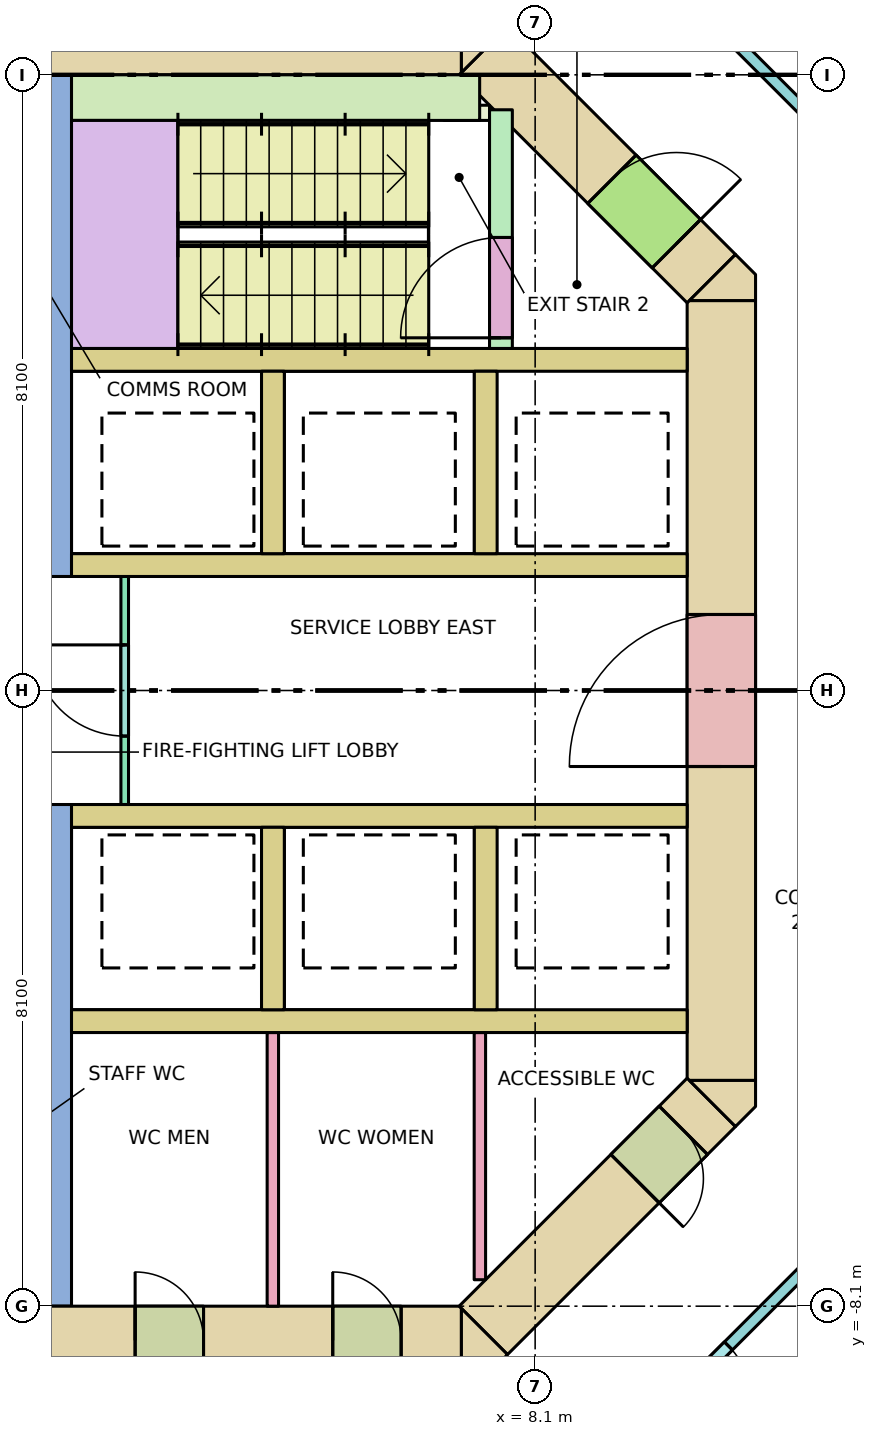
"""IFC4 building model, lengths in metres.
Left out: names, types, materials, properties, quantities, classifications, styles, units other than length and angle.
Written with IfcOpenShell. Run it as: python <this file> out.ifc"""

import sys

from ifc_helpers import new_model, si_unit, direction, frame, frame_2d, origin, place, context, subcontext, project, spatial, polyline, rectangle, outline, extrude, element, fill, save


model = new_model("IFC4")
c1 = context("Model", 3, precision=1e-05, world=origin(), true_north=direction((0.0, 1.0)))
c2 = subcontext(c1, "Body", "Model", "MODEL_VIEW")
j1 = project(units=[si_unit("LENGTHUNIT", "METRE"), si_unit("PLANEANGLEUNIT", "RADIAN")], contexts=[c1])
p1 = place(None, origin())
s1 = spatial("IfcSite", under=j1, at=p1, CompositionType="ELEMENT")
p2 = place(p1, origin())
s2 = spatial("IfcBuilding", under=s1, at=p2, CompositionType="ELEMENT")
p3 = place(p2, frame((0.0, 0.0, 71.0)))
s3 = spatial("IfcBuildingStorey", under=s2, at=p3, CompositionType="ELEMENT", Elevation=71.0)
p4 = place(p3, frame((-7.13, 8.55, -0.28), z_axis=(0.0, 0.0, 1.0), x_axis=(1.0, 0.0, 0.0)))
e1 = element("IfcWall", 1, at=p4, inside=s3, PredefinedType="SHEAR", context=c2, shape_type="SweptSolid", body=[
    extrude(rectangle(XDim=14.26, YDim=0.9, at=frame_2d((7.13, 0.0))), origin(), (0.0, 0.0, 1.0), 4.0),
])
p5 = place(p4, frame((5.48, 0.0, 0.28)))
e2 = element("IfcOpeningElement", 2, at=p5, cuts=e1, PredefinedType="OPENING", context=c2, shape_type="SweptSolid", body=[
    extrude(rectangle(XDim=0.7, YDim=2.1, at=frame_2d((0.35, 1.05))), frame((0.0, 0.46, 0.0), z_axis=(0.0, -1.0, 0.0), x_axis=(1.0, 0.0, 0.0)), (0.0, 0.0, 1.0), 0.92),
])
p6 = place(p4, frame((6.53, 0.0, 0.28)))
e3 = element("IfcOpeningElement", 3, at=p6, cuts=e1, PredefinedType="OPENING", context=c2, shape_type="SweptSolid", body=[
    extrude(rectangle(XDim=0.85, YDim=2.1, at=frame_2d((0.425, 1.05))), frame((0.0, 0.46, 0.0), z_axis=(0.0, -1.0, 0.0), x_axis=(1.0, 0.0, 0.0)), (0.0, 0.0, 1.0), 0.92),
])
p7 = place(p4, frame((7.83, 0.0, 0.28)))
e4 = element("IfcOpeningElement", 4, at=p7, cuts=e1, PredefinedType="OPENING", context=c2, shape_type="SweptSolid", body=[
    extrude(rectangle(XDim=0.85, YDim=2.1, at=frame_2d((0.425, 1.05))), frame((0.0, 0.46, 0.0), z_axis=(0.0, -1.0, 0.0), x_axis=(1.0, 0.0, 0.0)), (0.0, 0.0, 1.0), 0.92),
])
p8 = place(p3, frame((-7.13, -8.55, -0.28), z_axis=(0.0, 0.0, 1.0), x_axis=(1.0, 0.0, 0.0)))
e5 = element("IfcWall", 5, at=p8, inside=s3, PredefinedType="SHEAR", context=c2, shape_type="SweptSolid", body=[
    extrude(rectangle(XDim=14.26, YDim=0.9, at=frame_2d((7.13, 0.0))), origin(), (0.0, 0.0, 1.0), 4.0),
])
p9 = place(p8, frame((8.08, 0.0, 0.28)))
e6 = element("IfcOpeningElement", 6, at=p9, cuts=e5, PredefinedType="OPENING", context=c2, shape_type="SweptSolid", body=[
    extrude(rectangle(XDim=0.7, YDim=2.1, at=frame_2d((0.35, 1.05))), frame((0.0, 0.46, 0.0), z_axis=(0.0, -1.0, 0.0), x_axis=(1.0, 0.0, 0.0)), (0.0, 0.0, 1.0), 0.92),
])
p10 = place(p8, frame((5.58, 0.0, 0.28)))
e7 = element("IfcOpeningElement", 7, at=p10, cuts=e5, PredefinedType="OPENING", context=c2, shape_type="SweptSolid", body=[
    extrude(rectangle(XDim=0.85, YDim=2.1, at=frame_2d((0.425, 1.05))), frame((0.0, 0.46, 0.0), z_axis=(0.0, -1.0, 0.0), x_axis=(1.0, 0.0, 0.0)), (0.0, 0.0, 1.0), 0.92),
])
p11 = place(p8, frame((6.88, 0.0, 0.28)))
e8 = element("IfcOpeningElement", 8, at=p11, cuts=e5, PredefinedType="OPENING", context=c2, shape_type="SweptSolid", body=[
    extrude(rectangle(XDim=0.85, YDim=2.1, at=frame_2d((0.425, 1.05))), frame((0.0, 0.46, 0.0), z_axis=(0.0, -1.0, 0.0), x_axis=(1.0, 0.0, 0.0)), (0.0, 0.0, 1.0), 0.92),
])
p12 = place(p8, frame((9.967, 0.0, 0.28)))
e9 = element("IfcOpeningElement", 9, at=p12, cuts=e5, PredefinedType="OPENING", context=c2, shape_type="SweptSolid", body=[
    extrude(rectangle(XDim=0.9, YDim=2.1, at=frame_2d((0.45, 1.05))), frame((0.0, 0.46, 0.0), z_axis=(0.0, -1.0, 0.0), x_axis=(1.0, 0.0, 0.0)), (0.0, 0.0, 1.0), 0.92),
])
p13 = place(p8, frame((12.567, 0.0, 0.28)))
e10 = element("IfcOpeningElement", 10, at=p13, cuts=e5, PredefinedType="OPENING", context=c2, shape_type="SweptSolid", body=[
    extrude(rectangle(XDim=0.9, YDim=2.1, at=frame_2d((0.45, 1.05))), frame((0.0, 0.46, 0.0), z_axis=(0.0, -1.0, 0.0), x_axis=(1.0, 0.0, 0.0)), (0.0, 0.0, 1.0), 0.92),
])
p14 = place(p3, frame((10.55, -5.13, -0.28), z_axis=(0.0, 0.0, 1.0), x_axis=(0.0, 1.0, 0.0)))
e11 = element("IfcWall", 11, at=p14, inside=s3, PredefinedType="SHEAR", context=c2, shape_type="SweptSolid", body=[
    extrude(rectangle(XDim=10.26, YDim=0.9, at=frame_2d((5.13, 0.0))), origin(), (0.0, 0.0, 1.0), 4.0),
])
p15 = place(p14, frame((4.13, 0.0, 0.28)))
e12 = element("IfcOpeningElement", 12, at=p15, cuts=e11, PredefinedType="OPENING", context=c2, shape_type="SweptSolid", body=[
    extrude(rectangle(XDim=2.0, YDim=2.1, at=frame_2d((1.0, 1.05))), frame((0.0, 0.46, 0.0), z_axis=(0.0, -1.0, 0.0), x_axis=(1.0, 0.0, 0.0)), (0.0, 0.0, 1.0), 0.92),
])
p16 = place(p3, frame((7.418, 8.418, -0.28), z_axis=(0.0, 0.0, 1.0), x_axis=(0.707106781187, -0.707106781187, 0.0)))
e13 = element("IfcWall", 13, at=p16, inside=s3, PredefinedType="SHEAR", context=c2, shape_type="SweptSolid", body=[
    extrude(rectangle(XDim=4.243, YDim=0.9, at=frame_2d((2.121, 0.0))), origin(), (0.0, 0.0, 1.0), 4.0),
])
p17 = place(p16, frame((2.393, 0.0, 0.28)))
e14 = element("IfcOpeningElement", 14, at=p17, cuts=e13, PredefinedType="OPENING", context=c2, shape_type="SweptSolid", body=[
    extrude(rectangle(XDim=1.2, YDim=2.1, at=frame_2d((0.6, 1.05))), frame((0.0, 0.46, 0.0), z_axis=(0.0, -1.0, 0.0), x_axis=(1.0, 0.0, 0.0)), (0.0, 0.0, 1.0), 0.92),
])
p18 = place(p3, frame((10.418, -5.418, -0.28), z_axis=(0.0, 0.0, 1.0), x_axis=(-0.707106781187, -0.707106781187, 0.0)))
e15 = element("IfcWall", 15, at=p18, inside=s3, PredefinedType="SHEAR", context=c2, shape_type="SweptSolid", body=[
    extrude(rectangle(XDim=4.243, YDim=0.9, at=frame_2d((2.121, 0.0))), origin(), (0.0, 0.0, 1.0), 4.0),
])
p19 = place(p18, frame((0.52, 0.0, 0.28)))
e16 = element("IfcOpeningElement", 16, at=p19, cuts=e15, PredefinedType="OPENING", context=c2, shape_type="SweptSolid", body=[
    extrude(rectangle(XDim=0.9, YDim=2.1, at=frame_2d((0.45, 1.05))), frame((0.0, 0.46, 0.0), z_axis=(0.0, -1.0, 0.0), x_axis=(1.0, 0.0, 0.0)), (0.0, 0.0, 1.0), 0.92),
])
p20 = place(p3, frame((0.0, 0.0, -0.28)))
e17 = element("IfcWall", 17, at=p20, inside=s3, PredefinedType="SHEAR", context=c2, shape_type="SweptSolid", body=[
    extrude(outline(polyline([(7.473, -9.0), (7.13, -9.0), (7.13, -8.13), (7.736, -8.736), (7.473, -9.0)])), origin(), (0.0, 0.0, 1.0), 4.0),
])
p21 = place(p3, frame((0.0, 0.0, -0.28)))
e18 = element("IfcWall", 18, at=p21, inside=s3, PredefinedType="SHEAR", context=c2, shape_type="SweptSolid", body=[
    extrude(outline(polyline([(11.0, -5.473), (10.736, -5.736), (10.13, -5.13), (11.0, -5.13), (11.0, -5.473)])), origin(), (0.0, 0.0, 1.0), 4.0),
])
p22 = place(p3, frame((0.0, 0.0, -0.28)))
e19 = element("IfcWall", 19, at=p22, inside=s3, PredefinedType="SHEAR", context=c2, shape_type="SweptSolid", body=[
    extrude(outline(polyline([(11.0, 5.473), (11.0, 5.13), (10.13, 5.13), (10.736, 5.736), (11.0, 5.473)])), origin(), (0.0, 0.0, 1.0), 4.0),
])
p23 = place(p3, frame((0.0, 0.0, -0.28)))
e20 = element("IfcWall", 20, at=p23, inside=s3, PredefinedType="SHEAR", context=c2, shape_type="SweptSolid", body=[
    extrude(outline(polyline([(7.473, 9.0), (7.736, 8.736), (7.13, 8.13), (7.13, 9.0), (7.473, 9.0)])), origin(), (0.0, 0.0, 1.0), 4.0),
])
for number, where, z_axis, x_axis in (
    (21, (2.0, 4.35, 0.0), (0.0, 0.0, 1.0), (1.0, 0.0, 0.0)),
    (22, (2.0, -4.35, 0.0), (0.0, 0.0, 1.0), (1.0, 0.0, 0.0)),
    (23, (2.0, 1.65, 0.0), (0.0, 0.0, 1.0), (1.0, 0.0, 0.0)),
    (24, (2.0, -1.65, 0.0), (0.0, 0.0, 1.0), (1.0, 0.0, 0.0)),
):
    element("IfcWall", number, at=place(p3, frame(where, z_axis=z_axis, x_axis=x_axis)), inside=s3, PredefinedType="SOLIDWALL", context=c2, shape_type="SweptSolid", body=[
        extrude(rectangle(XDim=8.1, YDim=0.3, at=frame_2d((4.05, 0.0))), origin(), (0.0, 0.0, 1.0), 3.72),
    ])
for number, where, z_axis, x_axis in (
    (25, (4.65, 1.8, 0.0), (0.0, 0.0, 1.0), (0.0, 1.0, 0.0)),
    (26, (4.65, -4.2, 0.0), (0.0, 0.0, 1.0), (0.0, 1.0, 0.0)),
    (27, (7.45, 1.8, 0.0), (0.0, 0.0, 1.0), (0.0, 1.0, 0.0)),
    (28, (7.45, -4.2, 0.0), (0.0, 0.0, 1.0), (0.0, 1.0, 0.0)),
):
    element("IfcWall", number, at=place(p3, frame(where, z_axis=z_axis, x_axis=x_axis)), inside=s3, PredefinedType="SOLIDWALL", context=c2, shape_type="SweptSolid", body=[
        extrude(rectangle(XDim=2.4, YDim=0.3, at=frame_2d((1.2, 0.0))), origin(), (0.0, 0.0, 1.0), 3.72),
    ])
for number, where, z_axis, x_axis in (
    (29, (1.85, 1.5, 0.0), (0.0, 0.0, 1.0), (0.0, 1.0, 0.0)),
    (30, (1.85, -8.1, 0.0), (0.0, 0.0, 1.0), (0.0, 1.0, 0.0)),
):
    element("IfcWall", number, at=place(p3, frame(where, z_axis=z_axis, x_axis=x_axis)), inside=s3, PredefinedType="SHEAR", context=c2, shape_type="SweptSolid", body=[
        extrude(rectangle(XDim=6.6, YDim=0.3, at=frame_2d((3.3, 0.0))), origin(), (0.0, 0.0, 1.0), 3.72),
    ])
p24 = place(p3, frame((7.65, 4.5, 0.0), z_axis=(0.0, 0.0, 1.0), x_axis=(0.0, 1.0, 0.0)))
e31 = element("IfcWall", 31, at=p24, inside=s3, PredefinedType="SHEAR", context=c2, shape_type="SweptSolid", body=[
    extrude(rectangle(XDim=3.14, YDim=0.3, at=frame_2d((1.57, 0.0))), origin(), (0.0, 0.0, 1.0), 3.72),
])
p25 = place(p24, frame((0.14, 0.0, 0.0)))
e32 = element("IfcOpeningElement", 32, at=p25, cuts=e31, PredefinedType="OPENING", context=c2, shape_type="SweptSolid", body=[
    extrude(rectangle(XDim=1.32, YDim=2.1, at=frame_2d((0.66, 1.05))), frame((0.0, 0.16, 0.0), z_axis=(0.0, -1.0, 0.0), x_axis=(1.0, 0.0, 0.0)), (0.0, 0.0, 1.0), 0.32),
])
p26 = place(p3, frame((2.0, 7.8, 0.0), z_axis=(0.0, 0.0, 1.0), x_axis=(1.0, 0.0, 0.0)))
e33 = element("IfcWall", 33, at=p26, inside=s3, PredefinedType="SHEAR", context=c2, shape_type="SweptSolid", body=[
    extrude(rectangle(XDim=5.37, YDim=0.6, at=frame_2d((2.685, 0.0))), origin(), (0.0, 0.0, 1.0), 3.72),
])
p27 = place(p3, frame((6.9, 7.6, 0.0), z_axis=(0.0, 0.0, 1.0), x_axis=(1.0, 0.0, 0.0)))
e34 = element("IfcWall", 34, at=p27, inside=s3, PredefinedType="SHEAR", context=c2, shape_type="SweptSolid", body=[
    extrude(rectangle(XDim=0.6, YDim=0.2, at=frame_2d((0.3, 0.0))), origin(), (0.0, 0.0, 1.0), 3.72),
])
p28 = place(p3, frame((2.7, -1.5, 0.0), z_axis=(0.0, 0.0, 1.0), x_axis=(0.0, 1.0, 0.0)))
e35 = element("IfcWall", 35, at=p28, inside=s3, PredefinedType="PARTITIONING", context=c2, shape_type="SweptSolid", body=[
    extrude(rectangle(XDim=3.0, YDim=0.1, at=frame_2d((1.5, 0.0))), origin(), (0.0, 0.0, 1.0), 3.72),
])
p29 = place(p28, frame((0.9, 0.0, 0.0)))
e36 = element("IfcOpeningElement", 36, at=p29, cuts=e35, PredefinedType="OPENING", context=c2, shape_type="SweptSolid", body=[
    extrude(rectangle(XDim=1.2, YDim=2.1, at=frame_2d((0.6, 1.05))), frame((0.0, 0.06, 0.0), z_axis=(0.0, -1.0, 0.0), x_axis=(1.0, 0.0, 0.0)), (0.0, 0.0, 1.0), 0.12),
])
p30 = place(p3, frame((4.649, -8.1, 0.0), z_axis=(0.0, 0.0, 1.0), x_axis=(0.0, 1.0, 0.0)))
e37 = element("IfcWall", 37, at=p30, inside=s3, PredefinedType="PARTITIONING", context=c2, shape_type="SweptSolid", body=[
    extrude(rectangle(XDim=3.6, YDim=0.15, at=frame_2d((1.8, 0.0))), origin(), (0.0, 0.0, 1.0), 3.72),
])
p31 = place(p3, frame((7.373, -7.752, 0.0), z_axis=(0.0, 0.0, 1.0), x_axis=(0.0, 1.0, 0.0)))
e38 = element("IfcWall", 38, at=p31, inside=s3, PredefinedType="PARTITIONING", context=c2, shape_type="SweptSolid", body=[
    extrude(rectangle(XDim=3.252, YDim=0.15, at=frame_2d((1.626, 0.0))), origin(), (0.0, 0.0, 1.0), 3.72),
])
p32 = place(p3, frame((8.328, 10.938, 0.0), z_axis=(0.0, 0.0, 1.0), x_axis=(0.707125355289, -0.707088206597, 0.0)))
e39 = element("IfcWall", 39, at=p32, inside=s3, PredefinedType="PARTITIONING", context=c2, shape_type="SweptSolid", body=[
    extrude(rectangle(XDim=6.572, YDim=0.15, at=frame_2d((3.286, 0.0))), origin(), (0.0, 0.0, 1.0), 2.82),
])
p33 = place(p3, frame((12.975, -6.291, 0.0), z_axis=(0.0, 0.0, 1.0), x_axis=(-0.707125355289, -0.707088206597, 0.0)))
e40 = element("IfcWall", 40, at=p33, inside=s3, PredefinedType="PARTITIONING", context=c2, shape_type="SweptSolid", body=[
    extrude(rectangle(XDim=6.572, YDim=0.15, at=frame_2d((3.286, 0.0))), origin(), (0.0, 0.0, 1.0), 2.82),
])
p34 = place(p33, frame((3.298, 0.0, 0.0)))
e41 = element("IfcOpeningElement", 41, at=p34, cuts=e40, PredefinedType="OPENING", context=c2, shape_type="SweptSolid", body=[
    extrude(rectangle(XDim=1.0, YDim=2.1, at=frame_2d((0.5, 1.05))), frame((0.0, 0.085, 0.0), z_axis=(0.0, -1.0, 0.0), x_axis=(1.0, 0.0, 0.0)), (0.0, 0.0, 1.0), 0.17),
])
p35 = place(p25, origin())
e42 = element("IfcDoor", 42, at=p35, inside=s3, OperationType="DOUBLE_DOOR_SINGLE_SWING", PredefinedType="DOOR", context=c2, shape_type="SweptSolid", body=[
    extrude(rectangle(XDim=1.32, YDim=2.1, at=frame_2d((0.66, 1.05))), frame((0.0, 0.025, 0.0), z_axis=(0.0, -1.0, 0.0), x_axis=(1.0, 0.0, 0.0)), (0.0, 0.0, 1.0), 0.05),
])
fill(e32, e42)
p36 = place(p17, origin())
e43 = element("IfcDoor", 43, at=p36, inside=s3, OperationType="SINGLE_SWING_RIGHT", PredefinedType="DOOR", context=c2, shape_type="SweptSolid", body=[
    extrude(rectangle(XDim=1.2, YDim=2.1, at=frame_2d((0.6, 1.05))), frame((0.0, 0.025, 0.0), z_axis=(0.0, -1.0, 0.0), x_axis=(1.0, 0.0, 0.0)), (0.0, 0.0, 1.0), 0.05),
])
fill(e14, e43)
p37 = place(p15, origin())
e44 = element("IfcDoor", 44, at=p37, inside=s3, OperationType="DOUBLE_DOOR_SINGLE_SWING", PredefinedType="DOOR", context=c2, shape_type="SweptSolid", body=[
    extrude(rectangle(XDim=2.0, YDim=2.1, at=frame_2d((1.0, 1.05))), frame((0.0, 0.025, 0.0), z_axis=(0.0, -1.0, 0.0), x_axis=(1.0, 0.0, 0.0)), (0.0, 0.0, 1.0), 0.05),
])
fill(e12, e44)
p38 = place(p29, origin())
e45 = element("IfcDoor", 45, at=p38, inside=s3, OperationType="SINGLE_SWING_RIGHT", PredefinedType="DOOR", context=c2, shape_type="SweptSolid", body=[
    extrude(rectangle(XDim=1.2, YDim=2.1, at=frame_2d((0.6, 1.05))), frame((0.0, 0.025, 0.0), z_axis=(0.0, -1.0, 0.0), x_axis=(1.0, 0.0, 0.0)), (0.0, 0.0, 1.0), 0.05),
])
fill(e36, e45)
p39 = place(p12, origin())
e46 = element("IfcDoor", 46, at=p39, inside=s3, OperationType="SINGLE_SWING_LEFT", PredefinedType="DOOR", context=c2, shape_type="SweptSolid", body=[
    extrude(rectangle(XDim=0.9, YDim=2.1, at=frame_2d((0.45, 1.05))), frame((0.0, 0.025, 0.0), z_axis=(0.0, -1.0, 0.0), x_axis=(1.0, 0.0, 0.0)), (0.0, 0.0, 1.0), 0.05),
])
fill(e9, e46)
p40 = place(p13, origin())
e47 = element("IfcDoor", 47, at=p40, inside=s3, OperationType="SINGLE_SWING_LEFT", PredefinedType="DOOR", context=c2, shape_type="SweptSolid", body=[
    extrude(rectangle(XDim=0.9, YDim=2.1, at=frame_2d((0.45, 1.05))), frame((0.0, 0.025, 0.0), z_axis=(0.0, -1.0, 0.0), x_axis=(1.0, 0.0, 0.0)), (0.0, 0.0, 1.0), 0.05),
])
fill(e10, e47)
p41 = place(p19, origin())
e48 = element("IfcDoor", 48, at=p41, inside=s3, OperationType="SINGLE_SWING_RIGHT", PredefinedType="DOOR", context=c2, shape_type="SweptSolid", body=[
    extrude(rectangle(XDim=0.9, YDim=2.1, at=frame_2d((0.45, 1.05))), frame((0.0, 0.025, 0.0), z_axis=(0.0, -1.0, 0.0), x_axis=(1.0, 0.0, 0.0)), (0.0, 0.0, 1.0), 0.05),
])
fill(e16, e48)
p42 = place(p34, origin())
e49 = element("IfcDoor", 49, at=p42, inside=s3, OperationType="SINGLE_SWING_RIGHT", PredefinedType="DOOR", context=c2, shape_type="SweptSolid", body=[
    extrude(rectangle(XDim=1.0, YDim=2.1, at=frame_2d((0.5, 1.05))), frame((0.0, 0.025, 0.0), z_axis=(0.0, -1.0, 0.0), x_axis=(1.0, 0.0, 0.0)), (0.0, 0.0, 1.0), 0.05),
])
fill(e41, e49)
save(model, sys.argv[1])
